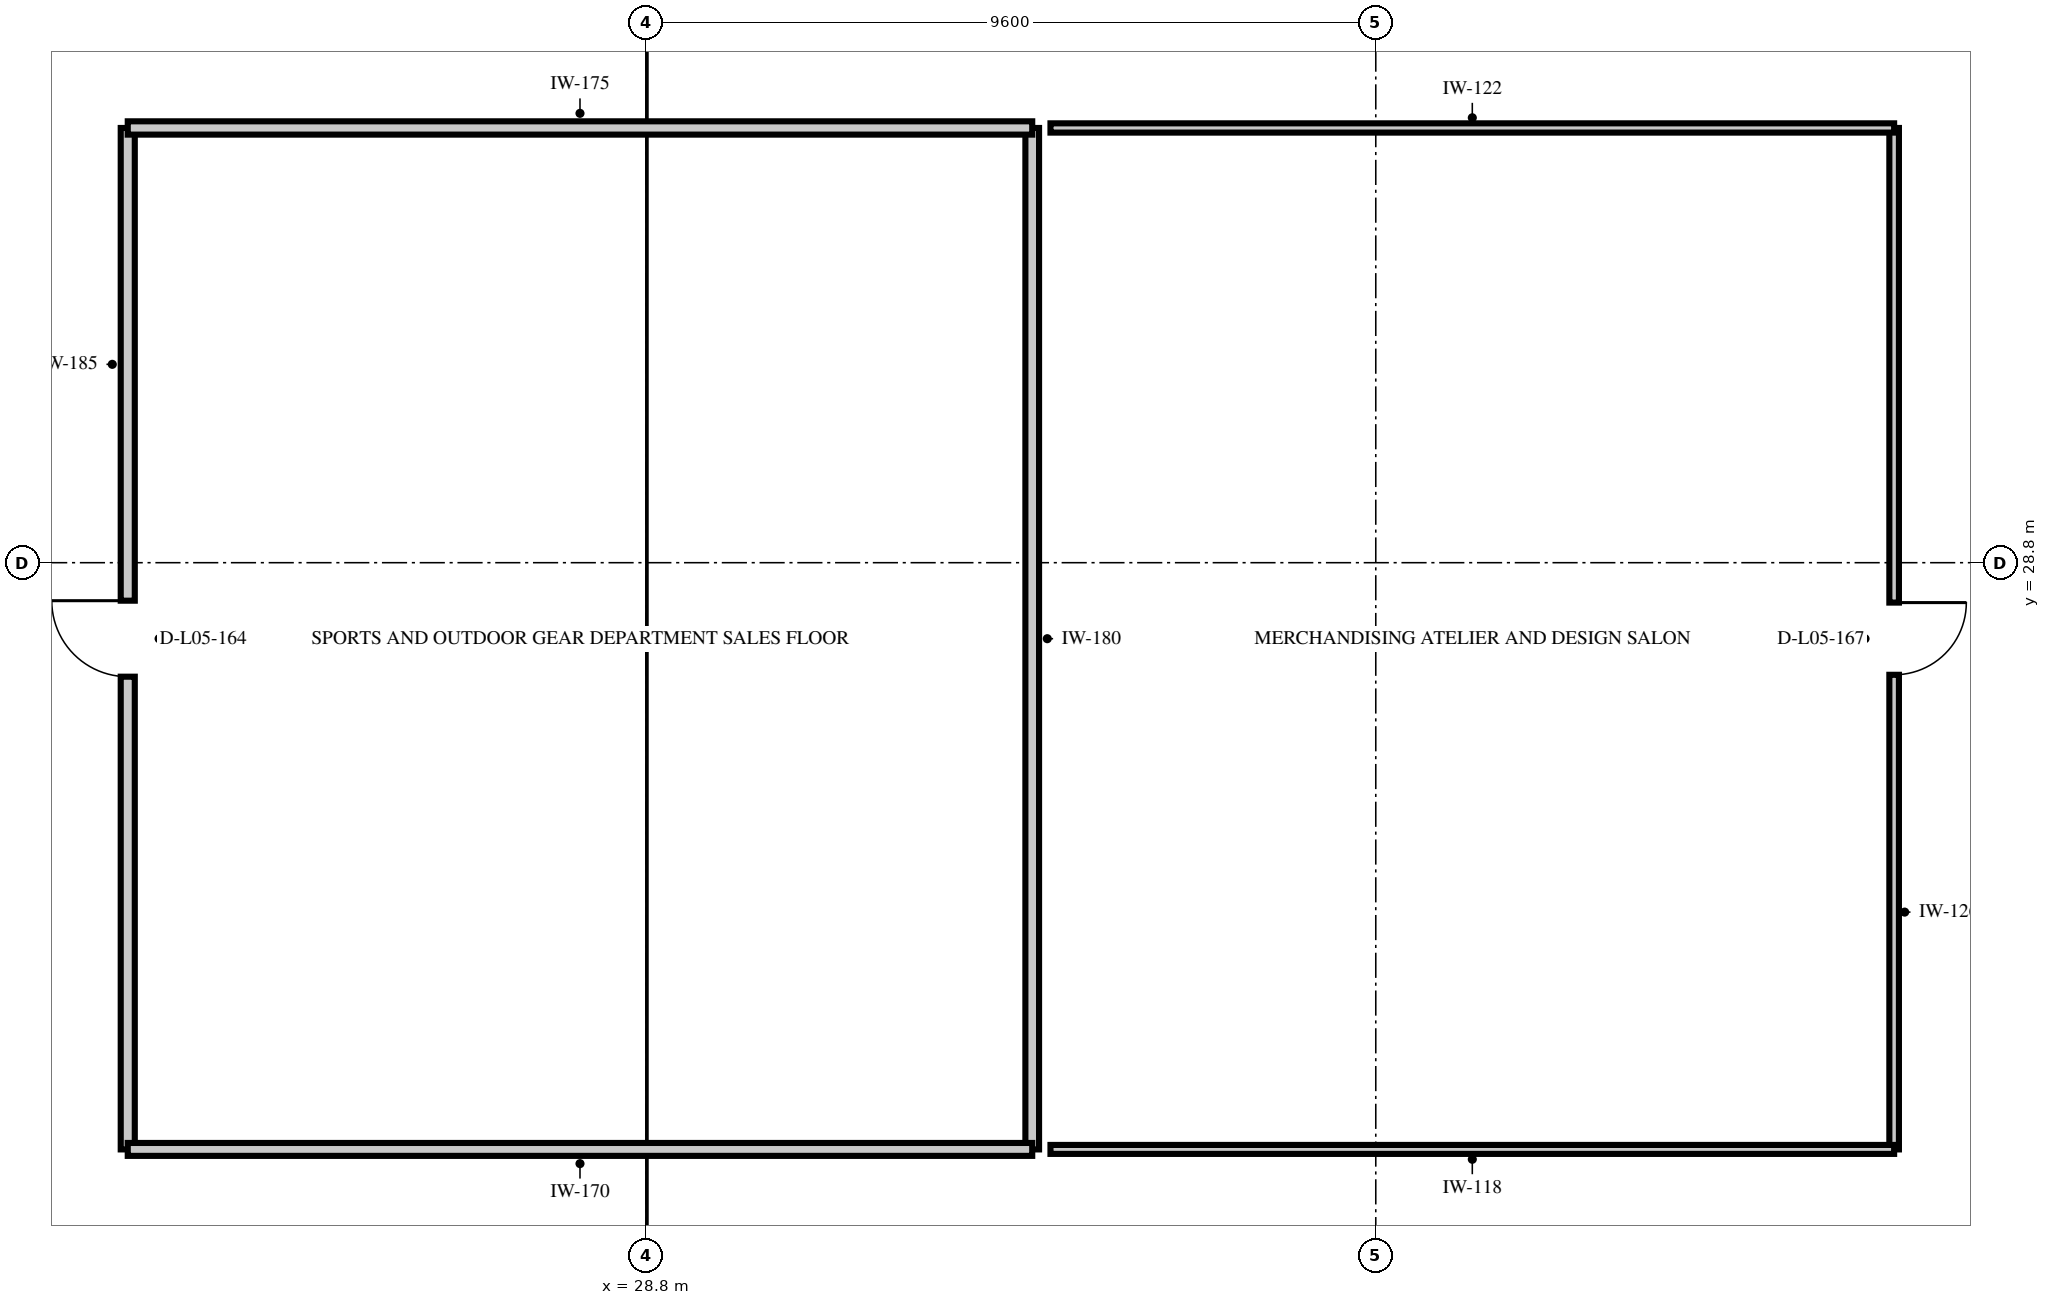
"""IFC4 building model, lengths in metres.
Left out: names, types, materials, properties, quantities, classifications, styles, units other than length and angle.
Written with IfcOpenShell. Run it as: python <this file> out.ifc"""

import sys

from ifc_helpers import new_model, si_unit, direction, frame, frame_2d, origin, place, context, subcontext, project, spatial, rectangle, extrude, element, fill, save


model = new_model("IFC4")
c1 = context("Model", 3, precision=1e-05, world=origin(), true_north=direction((0.0, 1.0)))
c2 = subcontext(c1, "Body", "Model", "MODEL_VIEW")
j1 = project(units=[si_unit("LENGTHUNIT", "METRE"), si_unit("PLANEANGLEUNIT", "RADIAN")], contexts=[c1])
p1 = place(None, origin())
s1 = spatial("IfcSite", under=j1, at=p1, CompositionType="ELEMENT")
p2 = place(p1, origin())
s2 = spatial("IfcBuilding", under=s1, at=p2, CompositionType="ELEMENT")
p3 = place(p2, frame((0.0, 0.0, 24.6)))
s3 = spatial("IfcBuildingStorey", under=s2, at=p3, CompositionType="ELEMENT", Elevation=24.6)
p4 = place(p3, frame((21.98, 21.08, 0.0), z_axis=(0.0, 0.0, 1.0), x_axis=(0.0, 1.0, 0.0)))
e1 = element("IfcWall", 1, at=p4, inside=s3, PredefinedType="PARTITIONING", context=c2, shape_type="SweptSolid", body=[
    extrude(rectangle(XDim=13.44, YDim=0.185, at=frame_2d((6.72, 0.0))), origin(), (0.0, 0.0, 1.0), 2.4),
])
p5 = place(p4, frame((6.22, 0.0, 0.0)))
e2 = element("IfcOpeningElement", 2, at=p5, cuts=e1, PredefinedType="OPENING", context=c2, shape_type="SweptSolid", body=[
    extrude(rectangle(XDim=1.0, YDim=2.2, at=frame_2d((0.5, 1.1))), frame((0.0, 0.104, 0.0), z_axis=(0.0, -1.0, 0.0), x_axis=(1.0, 0.0, 0.0)), (0.0, 0.0, 1.0), 0.209),
])
p6 = place(p3, frame((33.88, 34.52, 0.0), z_axis=(0.0, 0.0, 1.0), x_axis=(0.0, -1.0, 0.0)))
e3 = element("IfcWall", 3, at=p6, inside=s3, PredefinedType="PARTITIONING", context=c2, shape_type="SweptSolid", body=[
    extrude(rectangle(XDim=13.44, YDim=0.18, at=frame_2d((6.72, 0.0))), origin(), (0.0, 0.0, 1.0), 2.4),
])
p7 = place(p3, frame((21.98, 34.52, 0.0), z_axis=(0.0, 0.0, 1.0), x_axis=(1.0, 0.0, 0.0)))
e4 = element("IfcWall", 4, at=p7, inside=s3, PredefinedType="PARTITIONING", context=c2, shape_type="SweptSolid", body=[
    extrude(rectangle(XDim=11.9, YDim=0.175, at=frame_2d((5.95, 0.0))), origin(), (0.0, 0.0, 1.0), 4.51),
])
p8 = place(p3, frame((33.88, 21.08, 0.0), z_axis=(0.0, 0.0, 1.0), x_axis=(-1.0, 0.0, 0.0)))
e5 = element("IfcWall", 5, at=p8, inside=s3, PredefinedType="PARTITIONING", context=c2, shape_type="SweptSolid", body=[
    extrude(rectangle(XDim=11.9, YDim=0.17, at=frame_2d((5.95, 0.0))), origin(), (0.0, 0.0, 1.0), 4.51),
])
p9 = place(p3, frame((45.22, 34.52, 0.0), z_axis=(0.0, 0.0, 1.0), x_axis=(0.0, -1.0, 0.0)))
e6 = element("IfcWall", 6, at=p9, inside=s3, PredefinedType="PARTITIONING", context=c2, shape_type="SweptSolid", body=[
    extrude(rectangle(XDim=13.44, YDim=0.126, at=frame_2d((6.72, 0.0))), origin(), (0.0, 0.0, 1.0), 2.4),
])
p10 = place(p9, frame((6.245, 0.0, 0.0)))
e7 = element("IfcOpeningElement", 7, at=p10, cuts=e6, PredefinedType="OPENING", context=c2, shape_type="SweptSolid", body=[
    extrude(rectangle(XDim=0.95, YDim=2.1, at=frame_2d((0.475, 1.05))), frame((0.0, 0.075, 0.0), z_axis=(0.0, -1.0, 0.0), x_axis=(1.0, 0.0, 0.0)), (0.0, 0.0, 1.0), 0.15),
])
p11 = place(p3, frame((34.12, 34.52, 0.0), z_axis=(0.0, 0.0, 1.0), x_axis=(1.0, 0.0, 0.0)))
e8 = element("IfcWall", 8, at=p11, inside=s3, PredefinedType="PARTITIONING", context=c2, shape_type="SweptSolid", body=[
    extrude(rectangle(XDim=11.1, YDim=0.122, at=frame_2d((5.55, 0.0))), origin(), (0.0, 0.0, 1.0), 4.51),
])
p12 = place(p3, frame((45.22, 21.08, 0.0), z_axis=(0.0, 0.0, 1.0), x_axis=(-1.0, 0.0, 0.0)))
e9 = element("IfcWall", 9, at=p12, inside=s3, PredefinedType="PARTITIONING", context=c2, shape_type="SweptSolid", body=[
    extrude(rectangle(XDim=11.1, YDim=0.118, at=frame_2d((5.55, 0.0))), origin(), (0.0, 0.0, 1.0), 4.51),
])
p13 = place(p5, origin())
e10 = element("IfcDoor", 10, at=p13, inside=s3, OperationType="SINGLE_SWING_RIGHT", PredefinedType="DOOR", context=c2, shape_type="SweptSolid", body=[
    extrude(rectangle(XDim=1.0, YDim=2.2, at=frame_2d((0.5, 1.1))), frame((0.0, 0.025, 0.0), z_axis=(0.0, -1.0, 0.0), x_axis=(1.0, 0.0, 0.0)), (0.0, 0.0, 1.0), 0.05),
])
fill(e2, e10)
p14 = place(p10, origin())
e11 = element("IfcDoor", 11, at=p14, inside=s3, OperationType="SINGLE_SWING_LEFT", PredefinedType="DOOR", context=c2, shape_type="SweptSolid", body=[
    extrude(rectangle(XDim=0.95, YDim=2.1, at=frame_2d((0.475, 1.05))), frame((0.0, 0.025, 0.0), z_axis=(0.0, -1.0, 0.0), x_axis=(1.0, 0.0, 0.0)), (0.0, 0.0, 1.0), 0.05),
])
fill(e7, e11)
save(model, sys.argv[1])
